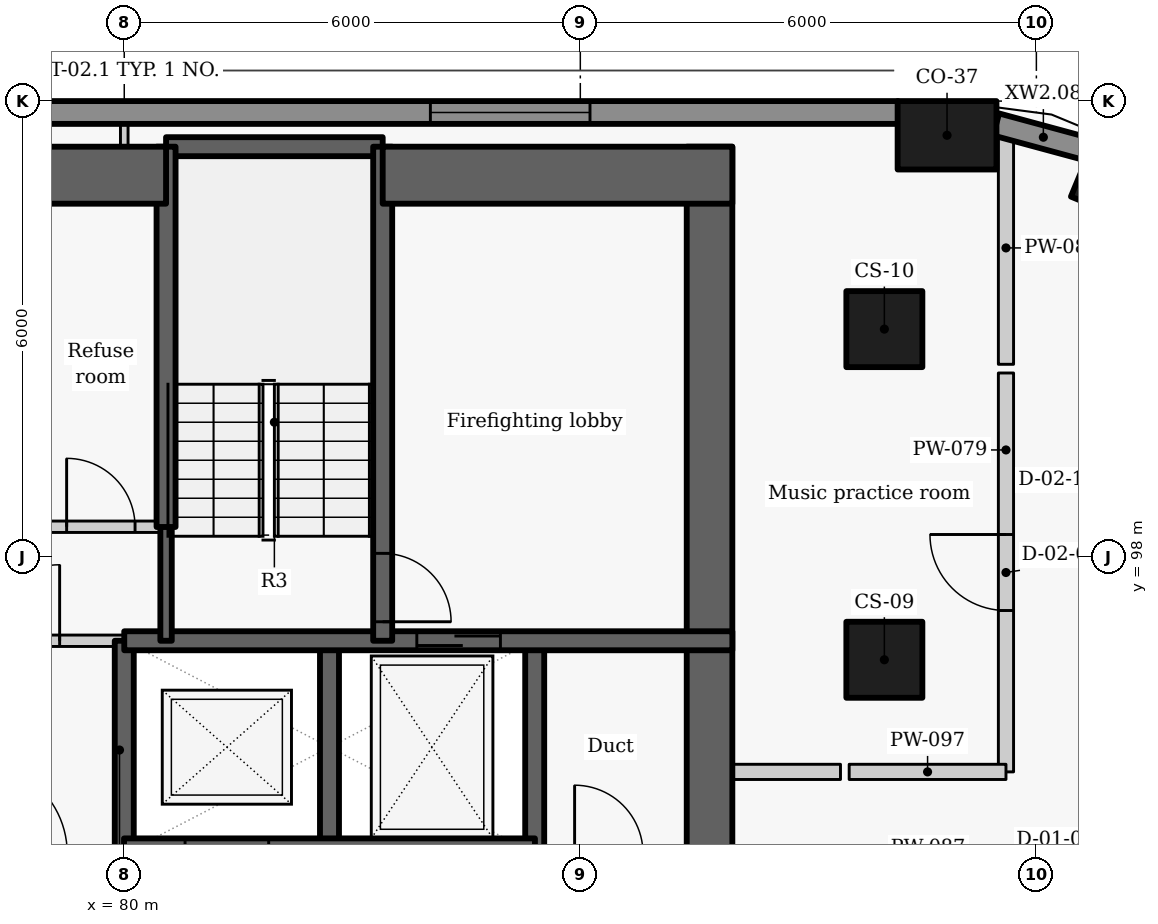
"""IFC4 building model, lengths in metres.
Left out: names, types, materials, properties, quantities, classifications, styles, units other than length and angle.
Written with IfcOpenShell. Run it as: python <this file> out.ifc"""

import sys

from ifc_helpers import new_model, si_unit, direction, frame, frame_2d, origin, origin_2d, place, context, subcontext, project, spatial, rectangle, extrude, element, fill, save


model = new_model("IFC4")
c1 = context("Model", 3, precision=1e-05, world=origin(), true_north=direction((0.0, 1.0)))
c2 = subcontext(c1, "Body", "Model", "MODEL_VIEW")
j1 = project(units=[si_unit("LENGTHUNIT", "METRE"), si_unit("PLANEANGLEUNIT", "RADIAN")], contexts=[c1])
p1 = place(None, origin())
s1 = spatial("IfcSite", under=j1, at=p1, CompositionType="ELEMENT")
p2 = place(p1, origin())
s2 = spatial("IfcBuilding", under=s1, at=p2, CompositionType="ELEMENT")
p3 = place(p2, frame((0.0, 0.0, 127.2)))
s3 = spatial("IfcBuildingStorey", under=s2, at=p3, CompositionType="ELEMENT", Elevation=127.2)
for number, where, z_axis, x_axis in (
    (1, (93.227, 102.91, 0.0), (0.0, 0.0, 1.0), (-0.924, 0.383, 0.0)),
    (2, (90.825, 103.55, 0.0), (0.0, 0.0, 1.0), (-1.0, 0.0, 0.0)),
):
    element("IfcColumn", number, at=place(p3, frame(where, z_axis=z_axis, x_axis=x_axis)), inside=s3, PredefinedType="COLUMN", context=c2, shape_type="SweptSolid", body=[
        extrude(rectangle(XDim=1.3, YDim=0.9, at=origin_2d()), origin(), (0.0, 0.0, 1.0), 3.3),
    ])
for number, where, z_axis, x_axis in (
    (3, (90.0, 96.65, 0.0), (0.0, 0.0, 1.0), (0.0, 1.0, 0.0)),
    (4, (90.0, 101.0, 0.0), (0.0, 0.0, 1.0), (0.0, 1.0, 0.0)),
):
    element("IfcColumn", number, at=place(p3, frame(where, z_axis=z_axis, x_axis=x_axis)), inside=s3, PredefinedType="COLUMN", context=c2, shape_type="SweptSolid", body=[
        extrude(rectangle(XDim=1.0, YDim=1.0, at=origin_2d()), origin(), (0.0, 0.0, 1.0), 3.3),
    ])
p4 = place(p3, frame((92.713, 103.356, 0.0), z_axis=(0.0, 0.0, 1.0), x_axis=(-0.965274225809, 0.26123872031, 0.0)))
e5 = element("IfcWall", 5, at=p4, inside=s3, PredefinedType="SOLIDWALL", context=c2, shape_type="SweptSolid", body=[
    extrude(rectangle(XDim=1.287, YDim=0.3, at=frame_2d((0.644, 0.0))), origin(), (0.0, 0.0, 1.0), 2.425),
])
p5 = place(p3, frame((90.179, 103.85, 0.0), z_axis=(0.0, 0.0, 1.0), x_axis=(-1.0, 0.0, 0.0)))
e6 = element("IfcWall", 6, at=p5, inside=s3, PredefinedType="SOLIDWALL", context=c2, shape_type="SweptSolid", body=[
    extrude(rectangle(XDim=20.391, YDim=0.3, at=frame_2d((10.196, 0.0))), origin(), (0.0, 0.0, 1.0), 2.425),
])
p6 = place(p5, frame((4.051, 0.0, 0.9)))
e7 = element("IfcOpeningElement", 7, at=p6, cuts=e6, PredefinedType="OPENING", context=c2, shape_type="SweptSolid", body=[
    extrude(rectangle(XDim=2.1, YDim=1.1, at=frame_2d((1.05, 0.55))), frame((0.0, 0.16, 0.0), z_axis=(0.0, -1.0, 0.0), x_axis=(1.0, 0.0, 0.0)), (0.0, 0.0, 1.0), 0.32),
])
p7 = place(p5, frame((14.212, 0.0, 0.9)))
e8 = element("IfcOpeningElement", 8, at=p7, cuts=e6, PredefinedType="OPENING", context=c2, shape_type="SweptSolid", body=[
    extrude(rectangle(XDim=2.1, YDim=1.1, at=frame_2d((1.05, 0.55))), frame((0.0, 0.16, 0.0), z_axis=(0.0, -1.0, 0.0), x_axis=(1.0, 0.0, 0.0)), (0.0, 0.0, 1.0), 0.32),
])
for number, where, z_axis, x_axis in (
    (9, (80.0, 94.1, -0.41), (0.0, 0.0, 1.0), (0.0, 1.0, 0.0)),
    (10, (82.7, 94.1, -0.41), (0.0, 0.0, 1.0), (0.0, 1.0, 0.0)),
    (11, (85.4, 94.1, -0.41), (0.0, 0.0, 1.0), (0.0, 1.0, 0.0)),
):
    element("IfcWall", number, at=place(p3, frame(where, z_axis=z_axis, x_axis=x_axis)), inside=s3, PredefinedType="SHEAR", context=c2, shape_type="SweptSolid", body=[
        extrude(rectangle(XDim=2.8, YDim=0.25, at=frame_2d((1.4, 0.0))), origin(), (0.0, 0.0, 1.0), 3.435),
    ])
p8 = place(p3, frame((87.7, 103.4, -0.41), z_axis=(0.0, 0.0, 1.0), x_axis=(0.0, -1.0, 0.0)))
e12 = element("IfcWall", 12, at=p8, inside=s3, PredefinedType="SHEAR", context=c2, shape_type="SweptSolid", body=[
    extrude(rectangle(XDim=15.6, YDim=0.6, at=frame_2d((7.8, 0.0))), origin(), (0.0, 0.0, 1.0), 3.435),
])
p9 = place(p8, frame((10.248, 0.0, 0.41)))
e13 = element("IfcOpeningElement", 13, at=p9, cuts=e12, PredefinedType="OPENING", context=c2, shape_type="SweptSolid", body=[
    extrude(rectangle(XDim=1.5, YDim=2.1, at=frame_2d((0.75, 1.05))), frame((0.0, 0.31, 0.0), z_axis=(0.0, -1.0, 0.0), x_axis=(1.0, 0.0, 0.0)), (0.0, 0.0, 1.0), 0.62),
])
p10 = place(p3, frame((79.997, 94.1, -0.41), z_axis=(0.0, 0.0, 1.0), x_axis=(1.0, 0.0, 0.0)))
e14 = element("IfcWall", 14, at=p10, inside=s3, PredefinedType="SHEAR", context=c2, shape_type="SweptSolid", body=[
    extrude(rectangle(XDim=5.406, YDim=0.4, at=frame_2d((2.703, 0.0))), origin(), (0.0, 0.0, 1.0), 3.435),
])
p11 = place(p10, frame((0.803, 0.0, 0.41)))
e15 = element("IfcOpeningElement", 15, at=p11, cuts=e14, PredefinedType="OPENING", context=c2, shape_type="SweptSolid", body=[
    extrude(rectangle(XDim=1.1, YDim=2.1, at=frame_2d((0.55, 1.05))), frame((0.0, 0.21, 0.0), z_axis=(0.0, -1.0, 0.0), x_axis=(1.0, 0.0, 0.0)), (0.0, 0.0, 1.0), 0.42),
])
p12 = place(p3, frame((80.0, 96.9, -0.41), z_axis=(0.0, 0.0, 1.0), x_axis=(1.0, 0.0, 0.0)))
e16 = element("IfcWall", 16, at=p12, inside=s3, PredefinedType="SHEAR", context=c2, shape_type="SweptSolid", body=[
    extrude(rectangle(XDim=8.0, YDim=0.25, at=frame_2d((4.0, 0.0))), origin(), (0.0, 0.0, 1.0), 3.435),
])
p13 = place(p12, frame((3.849, 0.0, 0.41)))
e17 = element("IfcOpeningElement", 17, at=p13, cuts=e16, PredefinedType="OPENING", context=c2, shape_type="SweptSolid", body=[
    extrude(rectangle(XDim=1.1, YDim=2.1, at=frame_2d((0.55, 1.05))), frame((0.0, 0.135, 0.0), z_axis=(0.0, -1.0, 0.0), x_axis=(1.0, 0.0, 0.0)), (0.0, 0.0, 1.0), 0.27),
])
p14 = place(p3, frame((77.3, 96.9, 0.0), z_axis=(0.0, 0.0, 1.0), x_axis=(1.0, 0.0, 0.0)))
e18 = element("IfcWall", 18, at=p14, inside=s3, PredefinedType="PARTITIONING", context=c2, shape_type="SweptSolid", body=[
    extrude(rectangle(XDim=2.7, YDim=0.15, at=frame_2d((1.35, 0.0))), origin(), (0.0, 0.0, 1.0), 3.025),
])
p15 = place(p14, frame((0.85, 0.0, 0.0)))
e19 = element("IfcOpeningElement", 19, at=p15, cuts=e18, PredefinedType="OPENING", context=c2, shape_type="SweptSolid", body=[
    extrude(rectangle(XDim=1.0, YDim=2.1, at=frame_2d((0.5, 1.05))), frame((0.0, 0.085, 0.0), z_axis=(0.0, -1.0, 0.0), x_axis=(1.0, 0.0, 0.0)), (0.0, 0.0, 1.0), 0.17),
])
p16 = place(p3, frame((80.55, 103.4, 0.0), z_axis=(0.0, 0.0, 1.0), x_axis=(1.0, 0.0, 0.0)))
e20 = element("IfcWall", 20, at=p16, inside=s3, PredefinedType="SHEAR", context=c2, shape_type="SweptSolid", body=[
    extrude(rectangle(XDim=2.85, YDim=0.25, at=frame_2d((1.425, 0.0))), origin(), (0.0, 0.0, 1.0), 3.025),
])
p17 = place(p3, frame((83.4, 103.4, -0.41), z_axis=(0.0, 0.0, 1.0), x_axis=(0.0, -1.0, 0.0)))
e21 = element("IfcWall", 21, at=p17, inside=s3, PredefinedType="SHEAR", context=c2, shape_type="SweptSolid", body=[
    extrude(rectangle(XDim=6.5, YDim=0.25, at=frame_2d((3.25, 0.0))), origin(), (0.0, 0.0, 1.0), 3.435),
])
p18 = place(p17, frame((5.35, 0.0, 0.41)))
e22 = element("IfcOpeningElement", 22, at=p18, cuts=e21, PredefinedType="OPENING", context=c2, shape_type="SweptSolid", body=[
    extrude(rectangle(XDim=0.9, YDim=2.1, at=frame_2d((0.45, 1.05))), frame((0.0, 0.135, 0.0), z_axis=(0.0, -1.0, 0.0), x_axis=(1.0, 0.0, 0.0)), (0.0, 0.0, 1.0), 0.27),
])
p19 = place(p3, frame((80.55, 96.9, -0.41), z_axis=(0.0, 0.0, 1.0), x_axis=(0.0, 1.0, 0.0)))
e23 = element("IfcWall", 23, at=p19, inside=s3, PredefinedType="SHEAR", context=c2, shape_type="SweptSolid", body=[
    extrude(rectangle(XDim=1.503, YDim=0.15, at=frame_2d((0.751, 0.0))), origin(), (0.0, 0.0, 1.0), 3.435),
])
p20 = place(p3, frame((80.55, 98.397, -0.41), z_axis=(0.0, 0.0, 1.0), x_axis=(0.0, 1.0, 0.0)))
e24 = element("IfcWall", 24, at=p20, inside=s3, PredefinedType="SHEAR", context=c2, shape_type="SweptSolid", body=[
    extrude(rectangle(XDim=5.003, YDim=0.25, at=frame_2d((2.501, 0.0))), origin(), (0.0, 0.0, 1.0), 3.435),
])
p21 = place(p3, frame((75.35, 103.025, -0.41), z_axis=(0.0, 0.0, 1.0), x_axis=(1.0, 0.0, 0.0)))
e25 = element("IfcWall", 25, at=p21, inside=s3, PredefinedType="SHEAR", context=c2, shape_type="SweptSolid", body=[
    extrude(rectangle(XDim=5.2, YDim=0.75, at=frame_2d((2.6, 0.0))), origin(), (0.0, 0.0, 1.0), 3.435),
])
p22 = place(p3, frame((83.4, 103.025, -0.41), z_axis=(0.0, 0.0, 1.0), x_axis=(1.0, 0.0, 0.0)))
e26 = element("IfcWall", 26, at=p22, inside=s3, PredefinedType="SHEAR", context=c2, shape_type="SweptSolid", body=[
    extrude(rectangle(XDim=4.6, YDim=0.75, at=frame_2d((2.3, 0.0))), origin(), (0.0, 0.0, 1.0), 3.435),
])
p23 = place(p3, frame((75.35, 98.4, 0.0), z_axis=(0.0, 0.0, 1.0), x_axis=(1.0, 0.0, 0.0)))
e27 = element("IfcWall", 27, at=p23, inside=s3, PredefinedType="PARTITIONING", context=c2, shape_type="SweptSolid", body=[
    extrude(rectangle(XDim=5.2, YDim=0.15, at=frame_2d((2.6, 0.0))), origin(), (0.0, 0.0, 1.0), 3.025),
])
p24 = place(p23, frame((0.434, 0.0, 0.0)))
e28 = element("IfcOpeningElement", 28, at=p24, cuts=e27, PredefinedType="OPENING", context=c2, shape_type="SweptSolid", body=[
    extrude(rectangle(XDim=0.9, YDim=2.1, at=frame_2d((0.45, 1.05))), frame((0.0, 0.085, 0.0), z_axis=(0.0, -1.0, 0.0), x_axis=(1.0, 0.0, 0.0)), (0.0, 0.0, 1.0), 0.17),
])
p25 = place(p23, frame((2.176, 0.0, 0.0)))
e29 = element("IfcOpeningElement", 29, at=p25, cuts=e27, PredefinedType="OPENING", context=c2, shape_type="SweptSolid", body=[
    extrude(rectangle(XDim=0.9, YDim=2.1, at=frame_2d((0.45, 1.05))), frame((0.0, 0.085, 0.0), z_axis=(0.0, -1.0, 0.0), x_axis=(1.0, 0.0, 0.0)), (0.0, 0.0, 1.0), 0.17),
])
p26 = place(p23, frame((3.892, 0.0, 0.0)))
e30 = element("IfcOpeningElement", 30, at=p26, cuts=e27, PredefinedType="OPENING", context=c2, shape_type="SweptSolid", body=[
    extrude(rectangle(XDim=0.9, YDim=2.1, at=frame_2d((0.45, 1.05))), frame((0.0, 0.085, 0.0), z_axis=(0.0, -1.0, 0.0), x_axis=(1.0, 0.0, 0.0)), (0.0, 0.0, 1.0), 0.17),
])
p27 = place(p3, frame((91.6, 95.175, 0.0), z_axis=(0.0, 0.0, 1.0), x_axis=(0.0, 1.0, 0.0)))
e31 = element("IfcWall", 31, at=p27, inside=s3, PredefinedType="PARTITIONING", context=c2, shape_type="SweptSolid", body=[
    extrude(rectangle(XDim=5.248, YDim=0.2, at=frame_2d((2.624, 0.0))), origin(), (0.0, 0.0, 1.0), 3.025),
])
p28 = place(p27, frame((2.123, 0.0, 0.0)))
e32 = element("IfcOpeningElement", 32, at=p28, cuts=e31, PredefinedType="OPENING", context=c2, shape_type="SweptSolid", body=[
    extrude(rectangle(XDim=1.0, YDim=2.1, at=frame_2d((0.5, 1.05))), frame((0.0, 0.11, 0.0), z_axis=(0.0, -1.0, 0.0), x_axis=(1.0, 0.0, 0.0)), (0.0, 0.0, 1.0), 0.22),
])
p29 = place(p3, frame((91.6, 100.537, 0.0), z_axis=(0.0, 0.0, 1.0), x_axis=(0.0, 1.0, 0.0)))
e33 = element("IfcWall", 33, at=p29, inside=s3, PredefinedType="PARTITIONING", context=c2, shape_type="SweptSolid", body=[
    extrude(rectangle(XDim=3.062, YDim=0.2, at=frame_2d((1.531, 0.0))), origin(), (0.0, 0.0, 1.0), 2.405),
])
p30 = place(p3, frame((88.0, 95.175, 0.0), z_axis=(0.0, 0.0, 1.0), x_axis=(1.0, 0.0, 0.0)))
e34 = element("IfcWall", 34, at=p30, inside=s3, PredefinedType="PARTITIONING", context=c2, shape_type="SweptSolid", body=[
    extrude(rectangle(XDim=1.423, YDim=0.2, at=frame_2d((0.711, 0.0))), origin(), (0.0, 0.0, 1.0), 3.025),
])
p31 = place(p3, frame((89.537, 95.175, 0.0), z_axis=(0.0, 0.0, 1.0), x_axis=(1.0, 0.0, 0.0)))
e35 = element("IfcWall", 35, at=p31, inside=s3, PredefinedType="PARTITIONING", context=c2, shape_type="SweptSolid", body=[
    extrude(rectangle(XDim=2.063, YDim=0.2, at=frame_2d((1.031, 0.0))), origin(), (0.0, 0.0, 1.0), 2.505),
])
p32 = place(p3, frame((80.0, 103.4, 0.0), z_axis=(0.0, 0.0, 1.0), x_axis=(0.0, 1.0, 0.0)))
e36 = element("IfcWall", 36, at=p32, inside=s3, PredefinedType="PARTITIONING", context=c2, shape_type="SweptSolid", body=[
    extrude(rectangle(XDim=0.3, YDim=0.1, at=frame_2d((0.15, 0.0))), origin(), (0.0, 0.0, 1.0), 3.025),
])
p33 = place(p6, origin())
e37 = element("IfcWindow", 37, at=p33, inside=s3, PartitioningType="SINGLE_PANEL", PredefinedType="WINDOW", context=c2, shape_type="SweptSolid", body=[
    extrude(rectangle(XDim=2.1, YDim=1.1, at=frame_2d((1.05, 0.55))), frame((0.0, 0.03, 0.0), z_axis=(0.0, -1.0, 0.0), x_axis=(1.0, 0.0, 0.0)), (0.0, 0.0, 1.0), 0.06),
])
fill(e7, e37)
p34 = place(p13, origin())
e38 = element("IfcDoor", 38, at=p34, inside=s3, OperationType="SLIDING_TO_LEFT", PredefinedType="DOOR", context=c2, shape_type="SweptSolid", body=[
    extrude(rectangle(XDim=1.1, YDim=2.1, at=frame_2d((0.55, 1.05))), frame((0.0, 0.025, 0.0), z_axis=(0.0, -1.0, 0.0), x_axis=(1.0, 0.0, 0.0)), (0.0, 0.0, 1.0), 0.05),
])
fill(e17, e38)
p35 = place(p15, origin())
e39 = element("IfcDoor", 39, at=p35, inside=s3, OperationType="SINGLE_SWING_RIGHT", PredefinedType="DOOR", context=c2, shape_type="SweptSolid", body=[
    extrude(rectangle(XDim=1.0, YDim=2.1, at=frame_2d((0.5, 1.05))), frame((0.0, 0.025, 0.0), z_axis=(0.0, -1.0, 0.0), x_axis=(1.0, 0.0, 0.0)), (0.0, 0.0, 1.0), 0.05),
])
fill(e19, e39)
p36 = place(p26, origin())
e40 = element("IfcDoor", 40, at=p36, inside=s3, OperationType="SINGLE_SWING_LEFT", PredefinedType="DOOR", context=c2, shape_type="SweptSolid", body=[
    extrude(rectangle(XDim=0.9, YDim=2.1, at=frame_2d((0.45, 1.05))), frame((0.0, 0.025, 0.0), z_axis=(0.0, -1.0, 0.0), x_axis=(1.0, 0.0, 0.0)), (0.0, 0.0, 1.0), 0.05),
])
fill(e30, e40)
p37 = place(p18, origin())
e41 = element("IfcDoor", 41, at=p37, inside=s3, OperationType="SINGLE_SWING_RIGHT", PredefinedType="DOOR", context=c2, shape_type="SweptSolid", body=[
    extrude(rectangle(XDim=0.9, YDim=2.1, at=frame_2d((0.45, 1.05))), frame((0.0, 0.025, 0.0), z_axis=(0.0, -1.0, 0.0), x_axis=(1.0, 0.0, 0.0)), (0.0, 0.0, 1.0), 0.05),
])
fill(e22, e41)
p38 = place(p28, origin())
e42 = element("IfcDoor", 42, at=p38, inside=s3, OperationType="SINGLE_SWING_RIGHT", PredefinedType="DOOR", context=c2, shape_type="SweptSolid", body=[
    extrude(rectangle(XDim=1.0, YDim=2.1, at=frame_2d((0.5, 1.05))), frame((0.0, 0.025, 0.0), z_axis=(0.0, -1.0, 0.0), x_axis=(1.0, 0.0, 0.0)), (0.0, 0.0, 1.0), 0.05),
])
fill(e32, e42)
save(model, sys.argv[1])
